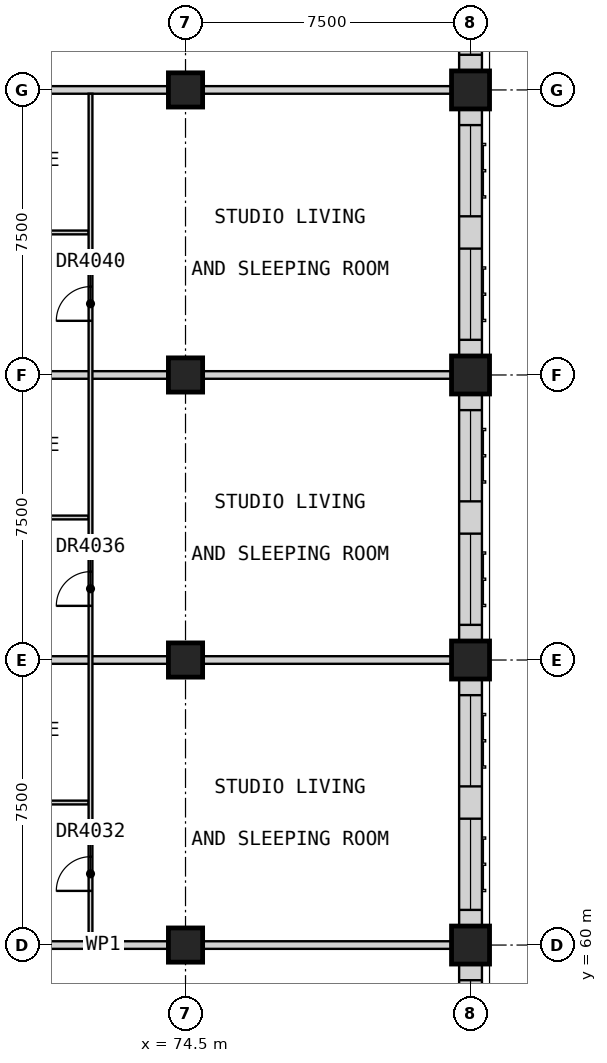
"""IFC4 building model, lengths in metres.
Left out: names, types, materials, properties, quantities, classifications, styles, units other than length and angle.
Written with IfcOpenShell. Run it as: python <this file> out.ifc"""

import sys

from ifc_helpers import new_model, si_unit, direction, frame, frame_2d, origin, origin_2d, place, context, subcontext, project, spatial, rectangle, extrude, element, fill, save


model = new_model("IFC4")
c1 = context("Model", 3, precision=1e-05, world=origin(), true_north=direction((0.0, 1.0)))
c2 = subcontext(c1, "Body", "Model", "MODEL_VIEW")
j1 = project(units=[si_unit("LENGTHUNIT", "METRE"), si_unit("PLANEANGLEUNIT", "RADIAN")], contexts=[c1])
p1 = place(None, origin())
s1 = spatial("IfcSite", under=j1, at=p1, CompositionType="ELEMENT")
p2 = place(p1, origin())
s2 = spatial("IfcBuilding", under=s1, at=p2, CompositionType="ELEMENT")
p3 = place(p2, frame((0.0, 0.0, 189.7)))
s3 = spatial("IfcBuildingStorey", under=s2, at=p3, CompositionType="ELEMENT", Elevation=189.7)
for number, where, z_axis, x_axis in (
    (1, (74.5, 60.0, 0.0), (0.0, 0.0, 1.0), (1.0, 0.0, 0.0)),
    (2, (74.5, 67.5, 0.0), (0.0, 0.0, 1.0), (1.0, 0.0, 0.0)),
    (3, (74.5, 75.0, 0.0), (0.0, 0.0, 1.0), (1.0, 0.0, 0.0)),
    (4, (74.5, 82.5, 0.0), (0.0, 0.0, 1.0), (1.0, 0.0, 0.0)),
):
    element("IfcColumn", number, at=place(p3, frame(where, z_axis=z_axis, x_axis=x_axis)), inside=s3, PredefinedType="COLUMN", context=c2, shape_type="SweptSolid", body=[
        extrude(rectangle(XDim=0.9, YDim=0.9, at=origin_2d()), origin(), (0.0, 0.0, 1.0), 3.5),
    ])
for number, where, z_axis, x_axis in (
    (5, (82.0, 60.0, 0.0), (0.0, 0.0, 1.0), (1.0, 0.0, 0.0)),
    (6, (82.0, 67.5, 0.0), (0.0, 0.0, 1.0), (1.0, 0.0, 0.0)),
    (7, (82.0, 75.0, 0.0), (0.0, 0.0, 1.0), (1.0, 0.0, 0.0)),
    (8, (82.0, 82.5, 0.0), (0.0, 0.0, 1.0), (1.0, 0.0, 0.0)),
):
    element("IfcColumn", number, at=place(p3, frame(where, z_axis=z_axis, x_axis=x_axis)), inside=s3, PredefinedType="COLUMN", context=c2, shape_type="SweptSolid", body=[
        extrude(rectangle(XDim=1.0, YDim=1.0, at=origin_2d()), origin(), (0.0, 0.0, 1.0), 3.5),
    ])
p4 = place(p3, frame((82.0, 53.0, 0.0), z_axis=(0.0, 0.0, 1.0), x_axis=(0.0, 1.0, 0.0)))
e9 = element("IfcWall", 9, at=p4, inside=s3, PredefinedType="SOLIDWALL", context=c2, shape_type="SweptSolid", body=[
    extrude(rectangle(XDim=6.5, YDim=0.6, at=frame_2d((3.25, 0.0))), origin(), (0.0, 0.0, 1.0), 2.75),
])
p5 = place(p4, frame((0.425, 0.0, 0.8)))
e10 = element("IfcOpeningElement", 10, at=p5, cuts=e9, PredefinedType="OPENING", context=c2, shape_type="SweptSolid", body=[
    extrude(rectangle(XDim=2.4, YDim=1.8, at=frame_2d((1.2, 0.9))), frame((0.0, 0.31, 0.0), z_axis=(0.0, -1.0, 0.0), x_axis=(1.0, 0.0, 0.0)), (0.0, 0.0, 1.0), 0.62),
])
p6 = place(p4, frame((3.675, 0.0, 0.8)))
e11 = element("IfcOpeningElement", 11, at=p6, cuts=e9, PredefinedType="OPENING", context=c2, shape_type="SweptSolid", body=[
    extrude(rectangle(XDim=2.4, YDim=1.8, at=frame_2d((1.2, 0.9))), frame((0.0, 0.31, 0.0), z_axis=(0.0, -1.0, 0.0), x_axis=(1.0, 0.0, 0.0)), (0.0, 0.0, 1.0), 0.62),
])
p7 = place(p3, frame((82.0, 60.5, 0.0), z_axis=(0.0, 0.0, 1.0), x_axis=(0.0, 1.0, 0.0)))
e12 = element("IfcWall", 12, at=p7, inside=s3, PredefinedType="SOLIDWALL", context=c2, shape_type="SweptSolid", body=[
    extrude(rectangle(XDim=6.5, YDim=0.6, at=frame_2d((3.25, 0.0))), origin(), (0.0, 0.0, 1.0), 2.75),
])
p8 = place(p7, frame((0.425, 0.0, 0.8)))
e13 = element("IfcOpeningElement", 13, at=p8, cuts=e12, PredefinedType="OPENING", context=c2, shape_type="SweptSolid", body=[
    extrude(rectangle(XDim=2.4, YDim=1.8, at=frame_2d((1.2, 0.9))), frame((0.0, 0.31, 0.0), z_axis=(0.0, -1.0, 0.0), x_axis=(1.0, 0.0, 0.0)), (0.0, 0.0, 1.0), 0.62),
])
p9 = place(p7, frame((3.675, 0.0, 0.8)))
e14 = element("IfcOpeningElement", 14, at=p9, cuts=e12, PredefinedType="OPENING", context=c2, shape_type="SweptSolid", body=[
    extrude(rectangle(XDim=2.4, YDim=1.8, at=frame_2d((1.2, 0.9))), frame((0.0, 0.31, 0.0), z_axis=(0.0, -1.0, 0.0), x_axis=(1.0, 0.0, 0.0)), (0.0, 0.0, 1.0), 0.62),
])
p10 = place(p3, frame((82.0, 68.0, 0.0), z_axis=(0.0, 0.0, 1.0), x_axis=(0.0, 1.0, 0.0)))
e15 = element("IfcWall", 15, at=p10, inside=s3, PredefinedType="SOLIDWALL", context=c2, shape_type="SweptSolid", body=[
    extrude(rectangle(XDim=6.5, YDim=0.6, at=frame_2d((3.25, 0.0))), origin(), (0.0, 0.0, 1.0), 2.75),
])
p11 = place(p10, frame((0.425, 0.0, 0.8)))
e16 = element("IfcOpeningElement", 16, at=p11, cuts=e15, PredefinedType="OPENING", context=c2, shape_type="SweptSolid", body=[
    extrude(rectangle(XDim=2.4, YDim=1.8, at=frame_2d((1.2, 0.9))), frame((0.0, 0.31, 0.0), z_axis=(0.0, -1.0, 0.0), x_axis=(1.0, 0.0, 0.0)), (0.0, 0.0, 1.0), 0.62),
])
p12 = place(p10, frame((3.675, 0.0, 0.8)))
e17 = element("IfcOpeningElement", 17, at=p12, cuts=e15, PredefinedType="OPENING", context=c2, shape_type="SweptSolid", body=[
    extrude(rectangle(XDim=2.4, YDim=1.8, at=frame_2d((1.2, 0.9))), frame((0.0, 0.31, 0.0), z_axis=(0.0, -1.0, 0.0), x_axis=(1.0, 0.0, 0.0)), (0.0, 0.0, 1.0), 0.62),
])
p13 = place(p3, frame((82.0, 75.5, 0.0), z_axis=(0.0, 0.0, 1.0), x_axis=(0.0, 1.0, 0.0)))
e18 = element("IfcWall", 18, at=p13, inside=s3, PredefinedType="SOLIDWALL", context=c2, shape_type="SweptSolid", body=[
    extrude(rectangle(XDim=6.5, YDim=0.6, at=frame_2d((3.25, 0.0))), origin(), (0.0, 0.0, 1.0), 2.75),
])
p14 = place(p13, frame((0.425, 0.0, 0.8)))
e19 = element("IfcOpeningElement", 19, at=p14, cuts=e18, PredefinedType="OPENING", context=c2, shape_type="SweptSolid", body=[
    extrude(rectangle(XDim=2.4, YDim=1.8, at=frame_2d((1.2, 0.9))), frame((0.0, 0.31, 0.0), z_axis=(0.0, -1.0, 0.0), x_axis=(1.0, 0.0, 0.0)), (0.0, 0.0, 1.0), 0.62),
])
p15 = place(p13, frame((3.675, 0.0, 0.8)))
e20 = element("IfcOpeningElement", 20, at=p15, cuts=e18, PredefinedType="OPENING", context=c2, shape_type="SweptSolid", body=[
    extrude(rectangle(XDim=2.4, YDim=1.8, at=frame_2d((1.2, 0.9))), frame((0.0, 0.31, 0.0), z_axis=(0.0, -1.0, 0.0), x_axis=(1.0, 0.0, 0.0)), (0.0, 0.0, 1.0), 0.62),
])
p16 = place(p3, frame((82.0, 83.0, 0.0), z_axis=(0.0, 0.0, 1.0), x_axis=(0.0, 1.0, 0.0)))
e21 = element("IfcWall", 21, at=p16, inside=s3, PredefinedType="SOLIDWALL", context=c2, shape_type="SweptSolid", body=[
    extrude(rectangle(XDim=6.5, YDim=0.6, at=frame_2d((3.25, 0.0))), origin(), (0.0, 0.0, 1.0), 2.75),
])
p17 = place(p16, frame((0.425, 0.0, 0.8)))
e22 = element("IfcOpeningElement", 22, at=p17, cuts=e21, PredefinedType="OPENING", context=c2, shape_type="SweptSolid", body=[
    extrude(rectangle(XDim=2.4, YDim=1.8, at=frame_2d((1.2, 0.9))), frame((0.0, 0.31, 0.0), z_axis=(0.0, -1.0, 0.0), x_axis=(1.0, 0.0, 0.0)), (0.0, 0.0, 1.0), 0.62),
])
p18 = place(p16, frame((3.675, 0.0, 0.8)))
e23 = element("IfcOpeningElement", 23, at=p18, cuts=e21, PredefinedType="OPENING", context=c2, shape_type="SweptSolid", body=[
    extrude(rectangle(XDim=2.4, YDim=1.8, at=frame_2d((1.2, 0.9))), frame((0.0, 0.31, 0.0), z_axis=(0.0, -1.0, 0.0), x_axis=(1.0, 0.0, 0.0)), (0.0, 0.0, 1.0), 0.62),
])
for number, where, z_axis, x_axis in (
    (24, (62.175, 60.0, 0.0), (0.0, 0.0, 1.0), (1.0, 0.0, 0.0)),
    (25, (62.175, 67.5, 0.0), (0.0, 0.0, 1.0), (1.0, 0.0, 0.0)),
    (26, (62.175, 75.0, 0.0), (0.0, 0.0, 1.0), (1.0, 0.0, 0.0)),
    (27, (62.175, 82.5, 0.0), (0.0, 0.0, 1.0), (1.0, 0.0, 0.0)),
):
    element("IfcWall", number, at=place(p3, frame(where, z_axis=z_axis, x_axis=x_axis)), inside=s3, PredefinedType="PARTITIONING", context=c2, shape_type="SweptSolid", body=[
        extrude(rectangle(XDim=20.325, YDim=0.2, at=frame_2d((10.163, 0.0))), origin(), (0.0, 0.0, 1.0), 3.25),
    ])
p19 = place(p3, frame((67.113, 63.75, 0.0), z_axis=(0.0, 0.0, 1.0), x_axis=(1.0, 0.0, 0.0)))
e28 = element("IfcWall", 28, at=p19, inside=s3, PredefinedType="PARTITIONING", context=c2, shape_type="SweptSolid", body=[
    extrude(rectangle(XDim=4.837, YDim=0.1, at=frame_2d((2.419, 0.0))), origin(), (0.0, 0.0, 1.0), 3.25),
])
p20 = place(p19, frame((1.962, 0.0, 0.0)))
e29 = element("IfcOpeningElement", 29, at=p20, cuts=e28, PredefinedType="OPENING", context=c2, shape_type="SweptSolid", body=[
    extrude(rectangle(XDim=0.9, YDim=2.1, at=frame_2d((0.45, 1.05))), frame((0.0, 0.06, 0.0), z_axis=(0.0, -1.0, 0.0), x_axis=(1.0, 0.0, 0.0)), (0.0, 0.0, 1.0), 0.12),
])
p21 = place(p3, frame((67.113, 71.25, 0.0), z_axis=(0.0, 0.0, 1.0), x_axis=(1.0, 0.0, 0.0)))
e30 = element("IfcWall", 30, at=p21, inside=s3, PredefinedType="PARTITIONING", context=c2, shape_type="SweptSolid", body=[
    extrude(rectangle(XDim=4.837, YDim=0.1, at=frame_2d((2.419, 0.0))), origin(), (0.0, 0.0, 1.0), 3.25),
])
p22 = place(p21, frame((1.962, 0.0, 0.0)))
e31 = element("IfcOpeningElement", 31, at=p22, cuts=e30, PredefinedType="OPENING", context=c2, shape_type="SweptSolid", body=[
    extrude(rectangle(XDim=0.9, YDim=2.1, at=frame_2d((0.45, 1.05))), frame((0.0, 0.06, 0.0), z_axis=(0.0, -1.0, 0.0), x_axis=(1.0, 0.0, 0.0)), (0.0, 0.0, 1.0), 0.12),
])
p23 = place(p3, frame((67.113, 78.75, 0.0), z_axis=(0.0, 0.0, 1.0), x_axis=(1.0, 0.0, 0.0)))
e32 = element("IfcWall", 32, at=p23, inside=s3, PredefinedType="PARTITIONING", context=c2, shape_type="SweptSolid", body=[
    extrude(rectangle(XDim=4.837, YDim=0.1, at=frame_2d((2.419, 0.0))), origin(), (0.0, 0.0, 1.0), 3.25),
])
p24 = place(p23, frame((1.962, 0.0, 0.0)))
e33 = element("IfcOpeningElement", 33, at=p24, cuts=e32, PredefinedType="OPENING", context=c2, shape_type="SweptSolid", body=[
    extrude(rectangle(XDim=0.9, YDim=2.1, at=frame_2d((0.45, 1.05))), frame((0.0, 0.06, 0.0), z_axis=(0.0, -1.0, 0.0), x_axis=(1.0, 0.0, 0.0)), (0.0, 0.0, 1.0), 0.12),
])
p25 = place(p3, frame((72.0, 60.1, 0.0), z_axis=(0.0, 0.0, 1.0), x_axis=(0.0, 1.0, 0.0)))
e34 = element("IfcWall", 34, at=p25, inside=s3, PredefinedType="PARTITIONING", context=c2, shape_type="SweptSolid", body=[
    extrude(rectangle(XDim=22.3, YDim=0.1, at=frame_2d((11.15, 0.0))), origin(), (0.0, 0.0, 1.0), 3.25),
])
p26 = place(p25, frame((1.325, 0.0, 0.0)))
e35 = element("IfcOpeningElement", 35, at=p26, cuts=e34, PredefinedType="OPENING", context=c2, shape_type="SweptSolid", body=[
    extrude(rectangle(XDim=0.9, YDim=2.1, at=frame_2d((0.45, 1.05))), frame((0.0, 0.06, 0.0), z_axis=(0.0, -1.0, 0.0), x_axis=(1.0, 0.0, 0.0)), (0.0, 0.0, 1.0), 0.12),
])
p27 = place(p25, frame((8.825, 0.0, 0.0)))
e36 = element("IfcOpeningElement", 36, at=p27, cuts=e34, PredefinedType="OPENING", context=c2, shape_type="SweptSolid", body=[
    extrude(rectangle(XDim=0.9, YDim=2.1, at=frame_2d((0.45, 1.05))), frame((0.0, 0.06, 0.0), z_axis=(0.0, -1.0, 0.0), x_axis=(1.0, 0.0, 0.0)), (0.0, 0.0, 1.0), 0.12),
])
p28 = place(p25, frame((16.325, 0.0, 0.0)))
e37 = element("IfcOpeningElement", 37, at=p28, cuts=e34, PredefinedType="OPENING", context=c2, shape_type="SweptSolid", body=[
    extrude(rectangle(XDim=0.9, YDim=2.1, at=frame_2d((0.45, 1.05))), frame((0.0, 0.06, 0.0), z_axis=(0.0, -1.0, 0.0), x_axis=(1.0, 0.0, 0.0)), (0.0, 0.0, 1.0), 0.12),
])
p29 = place(p6, origin())
e38 = element("IfcWindow", 38, at=p29, inside=s3, PartitioningType="SINGLE_PANEL", PredefinedType="WINDOW", context=c2, shape_type="SweptSolid", body=[
    extrude(rectangle(XDim=2.4, YDim=1.8, at=frame_2d((1.2, 0.9))), frame((0.0, -0.07, 0.0), z_axis=(0.0, -1.0, 0.0), x_axis=(1.0, 0.0, 0.0)), (0.0, 0.0, 1.0), 0.06),
])
fill(e11, e38)
p30 = place(p8, origin())
e39 = element("IfcWindow", 39, at=p30, inside=s3, PartitioningType="SINGLE_PANEL", PredefinedType="WINDOW", context=c2, shape_type="SweptSolid", body=[
    extrude(rectangle(XDim=2.4, YDim=1.8, at=frame_2d((1.2, 0.9))), frame((0.0, -0.07, 0.0), z_axis=(0.0, -1.0, 0.0), x_axis=(1.0, 0.0, 0.0)), (0.0, 0.0, 1.0), 0.06),
])
fill(e13, e39)
p31 = place(p9, origin())
e40 = element("IfcWindow", 40, at=p31, inside=s3, PartitioningType="SINGLE_PANEL", PredefinedType="WINDOW", context=c2, shape_type="SweptSolid", body=[
    extrude(rectangle(XDim=2.4, YDim=1.8, at=frame_2d((1.2, 0.9))), frame((0.0, -0.07, 0.0), z_axis=(0.0, -1.0, 0.0), x_axis=(1.0, 0.0, 0.0)), (0.0, 0.0, 1.0), 0.06),
])
fill(e14, e40)
p32 = place(p11, origin())
e41 = element("IfcWindow", 41, at=p32, inside=s3, PartitioningType="SINGLE_PANEL", PredefinedType="WINDOW", context=c2, shape_type="SweptSolid", body=[
    extrude(rectangle(XDim=2.4, YDim=1.8, at=frame_2d((1.2, 0.9))), frame((0.0, -0.07, 0.0), z_axis=(0.0, -1.0, 0.0), x_axis=(1.0, 0.0, 0.0)), (0.0, 0.0, 1.0), 0.06),
])
fill(e16, e41)
p33 = place(p12, origin())
e42 = element("IfcWindow", 42, at=p33, inside=s3, PartitioningType="SINGLE_PANEL", PredefinedType="WINDOW", context=c2, shape_type="SweptSolid", body=[
    extrude(rectangle(XDim=2.4, YDim=1.8, at=frame_2d((1.2, 0.9))), frame((0.0, -0.07, 0.0), z_axis=(0.0, -1.0, 0.0), x_axis=(1.0, 0.0, 0.0)), (0.0, 0.0, 1.0), 0.06),
])
fill(e17, e42)
p34 = place(p14, origin())
e43 = element("IfcWindow", 43, at=p34, inside=s3, PartitioningType="SINGLE_PANEL", PredefinedType="WINDOW", context=c2, shape_type="SweptSolid", body=[
    extrude(rectangle(XDim=2.4, YDim=1.8, at=frame_2d((1.2, 0.9))), frame((0.0, -0.07, 0.0), z_axis=(0.0, -1.0, 0.0), x_axis=(1.0, 0.0, 0.0)), (0.0, 0.0, 1.0), 0.06),
])
fill(e19, e43)
p35 = place(p15, origin())
e44 = element("IfcWindow", 44, at=p35, inside=s3, PartitioningType="SINGLE_PANEL", PredefinedType="WINDOW", context=c2, shape_type="SweptSolid", body=[
    extrude(rectangle(XDim=2.4, YDim=1.8, at=frame_2d((1.2, 0.9))), frame((0.0, -0.07, 0.0), z_axis=(0.0, -1.0, 0.0), x_axis=(1.0, 0.0, 0.0)), (0.0, 0.0, 1.0), 0.06),
])
fill(e20, e44)
p36 = place(p17, origin())
e45 = element("IfcWindow", 45, at=p36, inside=s3, PartitioningType="SINGLE_PANEL", PredefinedType="WINDOW", context=c2, shape_type="SweptSolid", body=[
    extrude(rectangle(XDim=2.4, YDim=1.8, at=frame_2d((1.2, 0.9))), frame((0.0, -0.07, 0.0), z_axis=(0.0, -1.0, 0.0), x_axis=(1.0, 0.0, 0.0)), (0.0, 0.0, 1.0), 0.06),
])
fill(e22, e45)
p37 = place(p26, origin())
e46 = element("IfcDoor", 46, at=p37, inside=s3, OperationType="SINGLE_SWING_LEFT", PredefinedType="DOOR", context=c2, shape_type="SweptSolid", body=[
    extrude(rectangle(XDim=0.9, YDim=2.1, at=frame_2d((0.45, 1.05))), frame((0.0, 0.025, 0.0), z_axis=(0.0, -1.0, 0.0), x_axis=(1.0, 0.0, 0.0)), (0.0, 0.0, 1.0), 0.05),
])
fill(e35, e46)
p38 = place(p27, origin())
e47 = element("IfcDoor", 47, at=p38, inside=s3, OperationType="SINGLE_SWING_LEFT", PredefinedType="DOOR", context=c2, shape_type="SweptSolid", body=[
    extrude(rectangle(XDim=0.9, YDim=2.1, at=frame_2d((0.45, 1.05))), frame((0.0, 0.025, 0.0), z_axis=(0.0, -1.0, 0.0), x_axis=(1.0, 0.0, 0.0)), (0.0, 0.0, 1.0), 0.05),
])
fill(e36, e47)
p39 = place(p28, origin())
e48 = element("IfcDoor", 48, at=p39, inside=s3, OperationType="SINGLE_SWING_LEFT", PredefinedType="DOOR", context=c2, shape_type="SweptSolid", body=[
    extrude(rectangle(XDim=0.9, YDim=2.1, at=frame_2d((0.45, 1.05))), frame((0.0, 0.025, 0.0), z_axis=(0.0, -1.0, 0.0), x_axis=(1.0, 0.0, 0.0)), (0.0, 0.0, 1.0), 0.05),
])
fill(e37, e48)
save(model, sys.argv[1])
